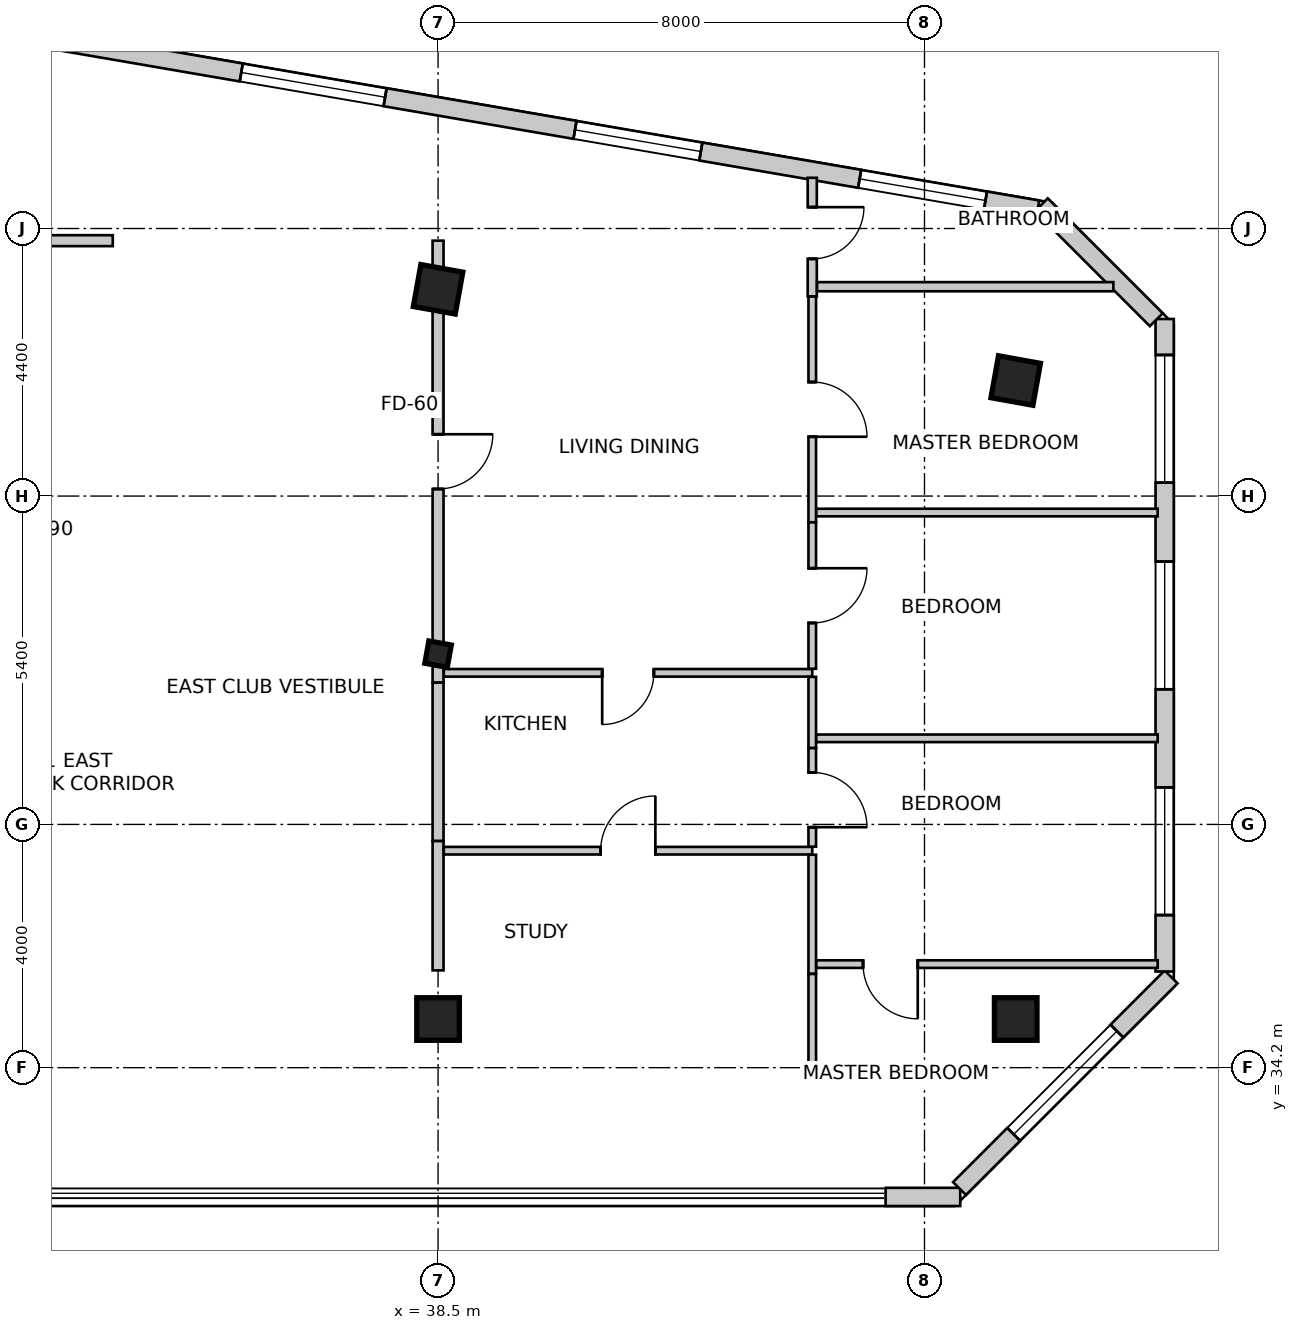
"""IFC4 building model, lengths in metres.
Left out: names, types, materials, properties, quantities, classifications, styles, units other than length and angle.
Written with IfcOpenShell. Run it as: python <this file> out.ifc"""

import sys

from ifc_helpers import new_model, si_unit, direction, frame, frame_2d, origin, origin_2d, place, context, subcontext, project, spatial, rectangle, i_section, extrude, source, transform, mapped, element, fill, save


model = new_model("IFC4")
c1 = context("Model", 3, precision=1e-05, world=origin(), true_north=direction((0.0, 1.0)))
c2 = subcontext(c1, "Body", "Model", "MODEL_VIEW")
j1 = project(units=[si_unit("LENGTHUNIT", "METRE"), si_unit("PLANEANGLEUNIT", "RADIAN")], contexts=[c1])
p1 = place(None, origin())
s1 = spatial("IfcSite", under=j1, at=p1, CompositionType="ELEMENT")
p2 = place(p1, origin())
s2 = spatial("IfcBuilding", under=s1, at=p2, CompositionType="ELEMENT")
p3 = place(p2, frame((0.0, 0.0, 204.4)))
s3 = spatial("IfcBuildingStorey", under=s2, at=p3, CompositionType="ELEMENT", Elevation=204.4)
m1 = source(origin(), c2, "Body", "SweptSolid", [
    extrude(rectangle(XDim=0.7, YDim=0.7, at=origin_2d()), origin(), (0.0, 0.0, 1.0), 3.5),
])
for number, where, z_axis, x_axis in (
    (1, (38.5, 47.0, 0.0), (0.0, 0.0, 1.0), (0.984, -0.177, 0.0)),
    (2, (48.0, 45.5, 0.0), (0.0, 0.0, 1.0), (0.984, -0.177, 0.0)),
    (3, (38.5, 35.0, 0.0), (0.0, 0.0, 1.0), (1.0, 0.0, 0.0)),
    (4, (48.0, 35.0, 0.0), (0.0, 0.0, 1.0), (1.0, 0.0, 0.0)),
):
    element("IfcColumn", number, at=place(p3, frame(where, z_axis=z_axis, x_axis=x_axis)), inside=s3, PredefinedType="COLUMN", context=c2, shape_type="MappedRepresentation", body=[
        mapped(m1, transform((0.0, 0.0, 0.0), scale=1.0)),
    ])
m2 = source(origin(), c2, "Body", "SweptSolid", [
    extrude(i_section(OverallWidth=0.374, OverallDepth=0.372, WebThickness=0.016, FlangeThickness=0.026, FilletRadius=0.015, at=origin_2d()), origin(), (0.0, 0.0, 1.0), 3.5),
])
p4 = place(p3, frame((38.5, 41.0, 0.0), z_axis=(0.0, 0.0, 1.0), x_axis=(0.984195607969, -0.17708474032, 0.0)))
e5 = element("IfcColumn", 5, at=p4, inside=s3, PredefinedType="COLUMN", context=c2, shape_type="MappedRepresentation", body=[
    mapped(m2, transform((0.0, 0.0, 0.0), scale=1.0)),
])
p5 = place(p3, frame((45.86, 32.074, 0.0), z_axis=(0.0, 0.0, 1.0), x_axis=(1.0, 0.0, 0.0)))
e6 = element("IfcWall", 6, at=p5, inside=s3, PredefinedType="SOLIDWALL", context=c2, shape_type="SweptSolid", body=[
    extrude(rectangle(XDim=1.228, YDim=0.3, at=frame_2d((0.614, 0.0))), origin(), (0.0, 0.0, 1.0), 3.25),
])
p6 = place(p3, frame((47.076, 32.212, 0.0), z_axis=(0.0, 0.0, 1.0), x_axis=(0.707106781187, 0.707106781187, 0.0)))
e7 = element("IfcWall", 7, at=p6, inside=s3, PredefinedType="SOLIDWALL", context=c2, shape_type="SweptSolid", body=[
    extrude(rectangle(XDim=4.922, YDim=0.3, at=frame_2d((2.461, 0.0))), origin(), (0.0, 0.0, 1.0), 3.25),
])
m3 = source(origin(), c2, "Body", "SweptSolid", [
    extrude(rectangle(XDim=2.4, YDim=2.2, at=frame_2d((1.2, 1.1))), frame((0.0, 0.16, 0.0), z_axis=(0.0, -1.0, 0.0), x_axis=(1.0, 0.0, 0.0)), (0.0, 0.0, 1.0), 0.32),
])
p7 = place(p6, frame((1.261, 0.0, 0.85)))
e8 = element("IfcOpeningElement", 8, at=p7, cuts=e7, PredefinedType="OPENING", context=c2, shape_type="MappedRepresentation", body=[
    mapped(m3, transform((0.0, 0.0, 0.0), scale=1.0)),
])
p8 = place(p3, frame((50.45, 35.781, 0.0), z_axis=(0.0, 0.0, 1.0), x_axis=(0.0, 1.0, 0.0)))
e9 = element("IfcWall", 9, at=p8, inside=s3, PredefinedType="SOLIDWALL", context=c2, shape_type="SweptSolid", body=[
    extrude(rectangle(XDim=10.731, YDim=0.3, at=frame_2d((5.365, 0.0))), origin(), (0.0, 0.0, 1.0), 3.25),
])
m4 = source(origin(), c2, "Body", "SweptSolid", [
    extrude(rectangle(XDim=2.1, YDim=2.0, at=frame_2d((1.05, 1.0))), frame((0.0, 0.16, 0.0), z_axis=(0.0, -1.0, 0.0), x_axis=(1.0, 0.0, 0.0)), (0.0, 0.0, 1.0), 0.32),
])
p9 = place(p8, frame((0.928, 0.0, 0.85)))
e10 = element("IfcOpeningElement", 10, at=p9, cuts=e9, PredefinedType="OPENING", context=c2, shape_type="MappedRepresentation", body=[
    mapped(m4, transform((0.0, 0.0, 0.0), scale=1.0)),
])
p10 = place(p8, frame((4.641, 0.0, 0.85)))
e11 = element("IfcOpeningElement", 11, at=p10, cuts=e9, PredefinedType="OPENING", context=c2, shape_type="MappedRepresentation", body=[
    mapped(m4, transform((0.0, 0.0, 0.0), scale=1.0)),
])
p11 = place(p8, frame((8.039, 0.0, 0.85)))
e12 = element("IfcOpeningElement", 12, at=p11, cuts=e9, PredefinedType="OPENING", context=c2, shape_type="MappedRepresentation", body=[
    mapped(m4, transform((0.0, 0.0, 0.0), scale=1.0)),
])
p12 = place(p3, frame((50.312, 46.5, 0.0), z_axis=(0.0, 0.0, 1.0), x_axis=(-0.707106781187, 0.707106781187, 0.0)))
e13 = element("IfcWall", 13, at=p12, inside=s3, PredefinedType="SOLIDWALL", context=c2, shape_type="SweptSolid", body=[
    extrude(rectangle(XDim=2.673, YDim=0.3, at=frame_2d((1.337, 0.0))), origin(), (0.0, 0.0, 1.0), 3.25),
])
p13 = place(p3, frame((48.361, 48.313, 0.0), z_axis=(0.0, 0.0, 1.0), x_axis=(-0.985523113069, 0.169541126597, 0.0)))
e14 = element("IfcWall", 14, at=p13, inside=s3, PredefinedType="SOLIDWALL", context=c2, shape_type="SweptSolid", body=[
    extrude(rectangle(XDim=26.866, YDim=0.3, at=frame_2d((13.433, 0.0))), origin(), (0.0, 0.0, 1.0), 3.25),
])
p14 = place(p13, frame((0.871, 0.0, 0.85)))
e15 = element("IfcOpeningElement", 15, at=p14, cuts=e14, PredefinedType="OPENING", context=c2, shape_type="MappedRepresentation", body=[
    mapped(m4, transform((0.0, 0.0, 0.0), scale=1.0)),
])
p15 = place(p13, frame((5.621, 0.0, 0.85)))
e16 = element("IfcOpeningElement", 16, at=p15, cuts=e14, PredefinedType="OPENING", context=c2, shape_type="MappedRepresentation", body=[
    mapped(m4, transform((0.0, 0.0, 0.0), scale=1.0)),
])
p16 = place(p13, frame((10.89, 0.0, 0.85)))
e17 = element("IfcOpeningElement", 17, at=p16, cuts=e14, PredefinedType="OPENING", context=c2, shape_type="MappedRepresentation", body=[
    mapped(m3, transform((0.0, 0.0, 0.0), scale=1.0)),
])
p17 = place(p13, frame((16.458, 0.0, 0.85)))
e18 = element("IfcOpeningElement", 18, at=p17, cuts=e14, PredefinedType="OPENING", context=c2, shape_type="MappedRepresentation", body=[
    mapped(m4, transform((0.0, 0.0, 0.0), scale=1.0)),
])
p18 = place(p13, frame((21.518, 0.0, 0.85)))
e19 = element("IfcOpeningElement", 19, at=p18, cuts=e14, PredefinedType="OPENING", context=c2, shape_type="MappedRepresentation", body=[
    mapped(m4, transform((0.0, 0.0, 0.0), scale=1.0)),
])
m5 = source(origin(), c2, "Body", "SweptSolid", [
    extrude(rectangle(XDim=1.2, YDim=1.6, at=frame_2d((0.6, 0.8))), frame((0.0, 0.16, 0.0), z_axis=(0.0, -1.0, 0.0), x_axis=(1.0, 0.0, 0.0)), (0.0, 0.0, 1.0), 0.32),
])
p19 = place(p13, frame((25.133, 0.0, 0.85)))
e20 = element("IfcOpeningElement", 20, at=p19, cuts=e14, PredefinedType="OPENING", context=c2, shape_type="MappedRepresentation", body=[
    mapped(m5, transform((0.0, 0.0, 0.0), scale=1.0)),
])
p20 = place(p3, frame((28.362, 47.8, 0.0), z_axis=(0.0, 0.0, 1.0), x_axis=(1.0, 0.0, 0.0)))
e21 = element("IfcWall", 21, at=p20, inside=s3, PredefinedType="PARTITIONING", context=c2, shape_type="SweptSolid", body=[
    extrude(rectangle(XDim=4.788, YDim=0.18, at=frame_2d((2.394, 0.0))), origin(), (0.0, 0.0, 1.0), 2.688),
])
m6 = source(origin(), c2, "Body", "SweptSolid", [
    extrude(rectangle(XDim=0.85, YDim=2.15, at=frame_2d((0.425, 1.075))), frame((0.0, 0.1, 0.0), z_axis=(0.0, -1.0, 0.0), x_axis=(1.0, 0.0, 0.0)), (0.0, 0.0, 1.0), 0.2),
])
p21 = place(p20, frame((0.401, 0.0, 0.0)))
e22 = element("IfcOpeningElement", 22, at=p21, cuts=e21, PredefinedType="OPENING", context=c2, shape_type="MappedRepresentation", body=[
    mapped(m6, transform((0.0, 0.0, 0.0), scale=1.0)),
])
p22 = place(p3, frame((38.5, 37.928, 0.0), z_axis=(0.0, 0.0, 1.0), x_axis=(0.0, -1.0, 0.0)))
e23 = element("IfcWall", 23, at=p22, inside=s3, PredefinedType="PARTITIONING", context=c2, shape_type="SweptSolid", body=[
    extrude(rectangle(XDim=2.128, YDim=0.18, at=frame_2d((1.064, 0.0))), origin(), (0.0, 0.0, 1.0), 2.766),
])
p23 = place(p3, frame((38.5, 47.8, 0.0), z_axis=(0.0, 0.0, 1.0), x_axis=(0.0, -1.0, 0.0)))
e24 = element("IfcWall", 24, at=p23, inside=s3, PredefinedType="PARTITIONING", context=c2, shape_type="SweptSolid", body=[
    extrude(rectangle(XDim=7.267, YDim=0.18, at=frame_2d((3.634, 0.0))), origin(), (0.0, 0.0, 1.0), 2.542),
])
m7 = source(origin(), c2, "Body", "SweptSolid", [
    extrude(rectangle(XDim=0.9, YDim=2.15, at=frame_2d((0.45, 1.075))), frame((0.0, 0.1, 0.0), z_axis=(0.0, -1.0, 0.0), x_axis=(1.0, 0.0, 0.0)), (0.0, 0.0, 1.0), 0.2),
])
p24 = place(p23, frame((3.184, 0.0, 0.0)))
e25 = element("IfcOpeningElement", 25, at=p24, cuts=e24, PredefinedType="OPENING", context=c2, shape_type="MappedRepresentation", body=[
    mapped(m7, transform((0.0, 0.0, 0.0), scale=1.0)),
])
p25 = place(p3, frame((38.5, 40.531, 0.0), z_axis=(0.0, 0.0, 1.0), x_axis=(0.0, -1.0, 0.0)))
e26 = element("IfcWall", 26, at=p25, inside=s3, PredefinedType="PARTITIONING", context=c2, shape_type="SweptSolid", body=[
    extrude(rectangle(XDim=2.601, YDim=0.18, at=frame_2d((1.301, 0.0))), origin(), (0.0, 0.0, 1.0), 2.766),
])
p26 = place(p3, frame((38.594, 37.768, 0.0), z_axis=(0.0, 0.0, 1.0), x_axis=(1.0, 0.0, 0.0)))
e27 = element("IfcWall", 27, at=p26, inside=s3, PredefinedType="PARTITIONING", context=c2, shape_type="SweptSolid", body=[
    extrude(rectangle(XDim=6.06, YDim=0.125, at=frame_2d((3.03, 0.0))), origin(), (0.0, 0.0, 1.0), 2.688),
])
m8 = source(origin(), c2, "Body", "SweptSolid", [
    extrude(rectangle(XDim=0.9, YDim=2.15, at=frame_2d((0.45, 1.075))), frame((0.0, 0.073, 0.0), z_axis=(0.0, -1.0, 0.0), x_axis=(1.0, 0.0, 0.0)), (0.0, 0.0, 1.0), 0.145),
])
p27 = place(p26, frame((2.58, 0.0, 0.0)))
e28 = element("IfcOpeningElement", 28, at=p27, cuts=e27, PredefinedType="OPENING", context=c2, shape_type="MappedRepresentation", body=[
    mapped(m8, transform((0.0, 0.0, 0.0), scale=1.0)),
])
p28 = place(p3, frame((44.654, 37.701, 0.0), z_axis=(0.0, 0.0, 1.0), x_axis=(0.0, -1.0, 0.0)))
e29 = element("IfcWall", 29, at=p28, inside=s3, PredefinedType="PARTITIONING", context=c2, shape_type="SweptSolid", body=[
    extrude(rectangle(XDim=1.958, YDim=0.125, at=frame_2d((0.979, 0.0))), origin(), (0.0, 0.0, 1.0), 2.688),
])
p29 = place(p3, frame((44.654, 35.741, 0.0), z_axis=(0.0, 0.0, 1.0), x_axis=(0.0, -1.0, 0.0)))
e30 = element("IfcWall", 30, at=p29, inside=s3, PredefinedType="PARTITIONING", context=c2, shape_type="SweptSolid", body=[
    extrude(rectangle(XDim=1.573, YDim=0.125, at=frame_2d((0.787, 0.0))), origin(), (0.0, 0.0, 1.0), 2.542),
])
p30 = place(p3, frame((44.654, 40.693, 0.0), z_axis=(0.0, 0.0, 1.0), x_axis=(-1.0, 0.0, 0.0)))
e31 = element("IfcWall", 31, at=p30, inside=s3, PredefinedType="PARTITIONING", context=c2, shape_type="SweptSolid", body=[
    extrude(rectangle(XDim=6.06, YDim=0.125, at=frame_2d((3.03, 0.0))), origin(), (0.0, 0.0, 1.0), 2.688),
])
m9 = source(origin(), c2, "Body", "SweptSolid", [
    extrude(rectangle(XDim=0.85, YDim=2.15, at=frame_2d((0.425, 1.075))), frame((0.0, 0.073, 0.0), z_axis=(0.0, -1.0, 0.0), x_axis=(1.0, 0.0, 0.0)), (0.0, 0.0, 1.0), 0.145),
])
p31 = place(p30, frame((2.605, 0.0, 0.0)))
e32 = element("IfcOpeningElement", 32, at=p31, cuts=e31, PredefinedType="OPENING", context=c2, shape_type="MappedRepresentation", body=[
    mapped(m9, transform((0.0, 0.0, 0.0), scale=1.0)),
])
p32 = place(p3, frame((44.654, 48.834, 0.0), z_axis=(0.0, 0.0, 1.0), x_axis=(0.0, -1.0, 0.0)))
e33 = element("IfcWall", 33, at=p32, inside=s3, PredefinedType="PARTITIONING", context=c2, shape_type="SweptSolid", body=[
    extrude(rectangle(XDim=1.951, YDim=0.15, at=frame_2d((0.976, 0.0))), origin(), (0.0, 0.0, 1.0), 3.25),
])
m10 = source(origin(), c2, "Body", "SweptSolid", [
    extrude(rectangle(XDim=0.85, YDim=2.15, at=frame_2d((0.425, 1.075))), frame((0.0, 0.085, 0.0), z_axis=(0.0, -1.0, 0.0), x_axis=(1.0, 0.0, 0.0)), (0.0, 0.0, 1.0), 0.17),
])
p33 = place(p32, frame((0.483, 0.0, 0.0)))
e34 = element("IfcOpeningElement", 34, at=p33, cuts=e33, PredefinedType="OPENING", context=c2, shape_type="MappedRepresentation", body=[
    mapped(m10, transform((0.0, 0.0, 0.0), scale=1.0)),
])
p34 = place(p3, frame((44.654, 46.881, 0.0), z_axis=(0.0, 0.0, 1.0), x_axis=(0.0, -1.0, 0.0)))
e35 = element("IfcWall", 35, at=p34, inside=s3, PredefinedType="PARTITIONING", context=c2, shape_type="SweptSolid", body=[
    extrude(rectangle(XDim=3.712, YDim=0.125, at=frame_2d((1.856, 0.0))), origin(), (0.0, 0.0, 1.0), 2.542),
])
p35 = place(p34, frame((1.406, 0.0, 0.0)))
e36 = element("IfcOpeningElement", 36, at=p35, cuts=e35, PredefinedType="OPENING", context=c2, shape_type="MappedRepresentation", body=[
    mapped(m8, transform((0.0, 0.0, 0.0), scale=1.0)),
])
p36 = place(p3, frame((44.654, 43.167, 0.0), z_axis=(0.0, 0.0, 1.0), x_axis=(0.0, -1.0, 0.0)))
e37 = element("IfcWall", 37, at=p36, inside=s3, PredefinedType="PARTITIONING", context=c2, shape_type="SweptSolid", body=[
    extrude(rectangle(XDim=2.407, YDim=0.125, at=frame_2d((1.204, 0.0))), origin(), (0.0, 0.0, 1.0), 2.688),
])
p37 = place(p36, frame((0.754, 0.0, 0.0)))
e38 = element("IfcOpeningElement", 38, at=p37, cuts=e37, PredefinedType="OPENING", context=c2, shape_type="MappedRepresentation", body=[
    mapped(m8, transform((0.0, 0.0, 0.0), scale=1.0)),
])
p38 = place(p3, frame((44.654, 40.626, 0.0), z_axis=(0.0, 0.0, 1.0), x_axis=(0.0, -1.0, 0.0)))
e39 = element("IfcWall", 39, at=p38, inside=s3, PredefinedType="PARTITIONING", context=c2, shape_type="SweptSolid", body=[
    extrude(rectangle(XDim=1.17, YDim=0.125, at=frame_2d((0.585, 0.0))), origin(), (0.0, 0.0, 1.0), 3.25),
])
p39 = place(p3, frame((44.654, 39.454, 0.0), z_axis=(0.0, 0.0, 1.0), x_axis=(0.0, -1.0, 0.0)))
e40 = element("IfcWall", 40, at=p39, inside=s3, PredefinedType="PARTITIONING", context=c2, shape_type="SweptSolid", body=[
    extrude(rectangle(XDim=1.62, YDim=0.125, at=frame_2d((0.81, 0.0))), origin(), (0.0, 0.0, 1.0), 2.835),
])
p40 = place(p39, frame((0.4, 0.0, 0.0)))
e41 = element("IfcOpeningElement", 41, at=p40, cuts=e40, PredefinedType="OPENING", context=c2, shape_type="MappedRepresentation", body=[
    mapped(m8, transform((0.0, 0.0, 0.0), scale=1.0)),
])
p41 = place(p3, frame((49.606, 47.043, 0.0), z_axis=(0.0, 0.0, 1.0), x_axis=(-1.0, 0.0, 0.0)))
e42 = element("IfcWall", 42, at=p41, inside=s3, PredefinedType="PARTITIONING", context=c2, shape_type="SweptSolid", body=[
    extrude(rectangle(XDim=4.873, YDim=0.15, at=frame_2d((2.437, 0.0))), origin(), (0.0, 0.0, 1.0), 3.25),
])
p42 = place(p3, frame((50.335, 43.329, 0.0), z_axis=(0.0, 0.0, 1.0), x_axis=(-1.0, 0.0, 0.0)))
e43 = element("IfcWall", 43, at=p42, inside=s3, PredefinedType="PARTITIONING", context=c2, shape_type="SweptSolid", body=[
    extrude(rectangle(XDim=5.615, YDim=0.125, at=frame_2d((2.807, 0.0))), origin(), (0.0, 0.0, 1.0), 2.688),
])
p43 = place(p3, frame((50.335, 39.616, 0.0), z_axis=(0.0, 0.0, 1.0), x_axis=(-1.0, 0.0, 0.0)))
e44 = element("IfcWall", 44, at=p43, inside=s3, PredefinedType="PARTITIONING", context=c2, shape_type="SweptSolid", body=[
    extrude(rectangle(XDim=5.615, YDim=0.125, at=frame_2d((2.807, 0.0))), origin(), (0.0, 0.0, 1.0), 2.766),
])
p44 = place(p3, frame((50.335, 35.903, 0.0), z_axis=(0.0, 0.0, 1.0), x_axis=(-1.0, 0.0, 0.0)))
e45 = element("IfcWall", 45, at=p44, inside=s3, PredefinedType="PARTITIONING", context=c2, shape_type="SweptSolid", body=[
    extrude(rectangle(XDim=5.615, YDim=0.125, at=frame_2d((2.807, 0.0))), origin(), (0.0, 0.0, 1.0), 2.688),
])
p45 = place(p44, frame((3.946, 0.0, 0.0)))
e46 = element("IfcOpeningElement", 46, at=p45, cuts=e45, PredefinedType="OPENING", context=c2, shape_type="MappedRepresentation", body=[
    mapped(m8, transform((0.0, 0.0, 0.0), scale=1.0)),
])
m11 = source(origin(), c2, "Body", "SweptSolid", [
    extrude(rectangle(XDim=2.4, YDim=2.2, at=frame_2d((1.2, 1.1))), frame((0.0, -0.015, 0.0), z_axis=(0.0, -1.0, 0.0), x_axis=(1.0, 0.0, 0.0)), (0.0, 0.0, 1.0), 0.06),
])
p46 = place(p7, origin())
e47 = element("IfcWindow", 47, at=p46, inside=s3, PartitioningType="SINGLE_PANEL", PredefinedType="WINDOW", context=c2, shape_type="MappedRepresentation", body=[
    mapped(m11, transform((0.0, 0.0, 0.0), scale=1.0)),
])
fill(e8, e47)
m12 = source(origin(), c2, "Body", "SweptSolid", [
    extrude(rectangle(XDim=2.1, YDim=2.0, at=frame_2d((1.05, 1.0))), frame((0.0, -0.015, 0.0), z_axis=(0.0, -1.0, 0.0), x_axis=(1.0, 0.0, 0.0)), (0.0, 0.0, 1.0), 0.06),
])
p47 = place(p9, origin())
e48 = element("IfcWindow", 48, at=p47, inside=s3, PartitioningType="SINGLE_PANEL", PredefinedType="WINDOW", context=c2, shape_type="MappedRepresentation", body=[
    mapped(m12, transform((0.0, 0.0, 0.0), scale=1.0)),
])
fill(e10, e48)
p48 = place(p10, origin())
e49 = element("IfcWindow", 49, at=p48, inside=s3, PartitioningType="SINGLE_PANEL", PredefinedType="WINDOW", context=c2, shape_type="MappedRepresentation", body=[
    mapped(m12, transform((0.0, 0.0, 0.0), scale=1.0)),
])
fill(e11, e49)
p49 = place(p11, origin())
e50 = element("IfcWindow", 50, at=p49, inside=s3, PartitioningType="SINGLE_PANEL", PredefinedType="WINDOW", context=c2, shape_type="MappedRepresentation", body=[
    mapped(m12, transform((0.0, 0.0, 0.0), scale=1.0)),
])
fill(e12, e50)
p50 = place(p14, origin())
e51 = element("IfcWindow", 51, at=p50, inside=s3, PartitioningType="SINGLE_PANEL", PredefinedType="WINDOW", context=c2, shape_type="MappedRepresentation", body=[
    mapped(m12, transform((0.0, 0.0, 0.0), scale=1.0)),
])
fill(e15, e51)
p51 = place(p15, origin())
e52 = element("IfcWindow", 52, at=p51, inside=s3, PartitioningType="SINGLE_PANEL", PredefinedType="WINDOW", context=c2, shape_type="MappedRepresentation", body=[
    mapped(m12, transform((0.0, 0.0, 0.0), scale=1.0)),
])
fill(e16, e52)
p52 = place(p16, origin())
e53 = element("IfcWindow", 53, at=p52, inside=s3, PartitioningType="SINGLE_PANEL", PredefinedType="WINDOW", context=c2, shape_type="MappedRepresentation", body=[
    mapped(m11, transform((0.0, 0.0, 0.0), scale=1.0)),
])
fill(e17, e53)
m13 = source(origin(), c2, "Body", "SweptSolid", [
    extrude(rectangle(XDim=0.9, YDim=2.15, at=frame_2d((0.45, 1.075))), frame((0.0, 0.025, 0.0), z_axis=(0.0, -1.0, 0.0), x_axis=(1.0, 0.0, 0.0)), (0.0, 0.0, 1.0), 0.05),
])
p53 = place(p27, origin())
e54 = element("IfcDoor", 54, at=p53, inside=s3, OperationType="SINGLE_SWING_RIGHT", PredefinedType="DOOR", context=c2, shape_type="MappedRepresentation", body=[
    mapped(m13, transform((0.0, 0.0, 0.0), scale=1.0)),
])
fill(e28, e54)
m14 = source(origin(), c2, "Body", "SweptSolid", [
    extrude(rectangle(XDim=0.9, YDim=2.15, at=frame_2d((0.45, 1.075))), frame((0.0, 0.025, 0.0), z_axis=(0.0, -1.0, 0.0), x_axis=(1.0, 0.0, 0.0)), (0.0, 0.0, 1.0), 0.05),
])
p54 = place(p24, origin())
e55 = element("IfcDoor", 55, at=p54, inside=s3, OperationType="SINGLE_SWING_LEFT", PredefinedType="DOOR", context=c2, shape_type="MappedRepresentation", body=[
    mapped(m14, transform((0.0, 0.0, 0.0), scale=1.0)),
])
fill(e25, e55)
m15 = source(origin(), c2, "Body", "SweptSolid", [
    extrude(rectangle(XDim=0.85, YDim=2.15, at=frame_2d((0.425, 1.075))), frame((0.0, 0.025, 0.0), z_axis=(0.0, -1.0, 0.0), x_axis=(1.0, 0.0, 0.0)), (0.0, 0.0, 1.0), 0.05),
])
p55 = place(p31, origin())
e56 = element("IfcDoor", 56, at=p55, inside=s3, OperationType="SINGLE_SWING_RIGHT", PredefinedType="DOOR", context=c2, shape_type="MappedRepresentation", body=[
    mapped(m15, transform((0.0, 0.0, 0.0), scale=1.0)),
])
fill(e32, e56)
p56 = place(p33, origin())
e57 = element("IfcDoor", 57, at=p56, inside=s3, OperationType="SINGLE_SWING_LEFT", PredefinedType="DOOR", context=c2, shape_type="MappedRepresentation", body=[
    mapped(m15, transform((0.0, 0.0, 0.0), scale=1.0)),
])
fill(e34, e57)
p57 = place(p35, origin())
e58 = element("IfcDoor", 58, at=p57, inside=s3, OperationType="SINGLE_SWING_RIGHT", PredefinedType="DOOR", context=c2, shape_type="MappedRepresentation", body=[
    mapped(m13, transform((0.0, 0.0, 0.0), scale=1.0)),
])
fill(e36, e58)
p58 = place(p37, origin())
e59 = element("IfcDoor", 59, at=p58, inside=s3, OperationType="SINGLE_SWING_LEFT", PredefinedType="DOOR", context=c2, shape_type="MappedRepresentation", body=[
    mapped(m13, transform((0.0, 0.0, 0.0), scale=1.0)),
])
fill(e38, e59)
p59 = place(p40, origin())
e60 = element("IfcDoor", 60, at=p59, inside=s3, OperationType="SINGLE_SWING_RIGHT", PredefinedType="DOOR", context=c2, shape_type="MappedRepresentation", body=[
    mapped(m13, transform((0.0, 0.0, 0.0), scale=1.0)),
])
fill(e41, e60)
p60 = place(p45, origin())
e61 = element("IfcDoor", 61, at=p60, inside=s3, OperationType="SINGLE_SWING_LEFT", PredefinedType="DOOR", context=c2, shape_type="MappedRepresentation", body=[
    mapped(m13, transform((0.0, 0.0, 0.0), scale=1.0)),
])
fill(e46, e61)
save(model, sys.argv[1])
